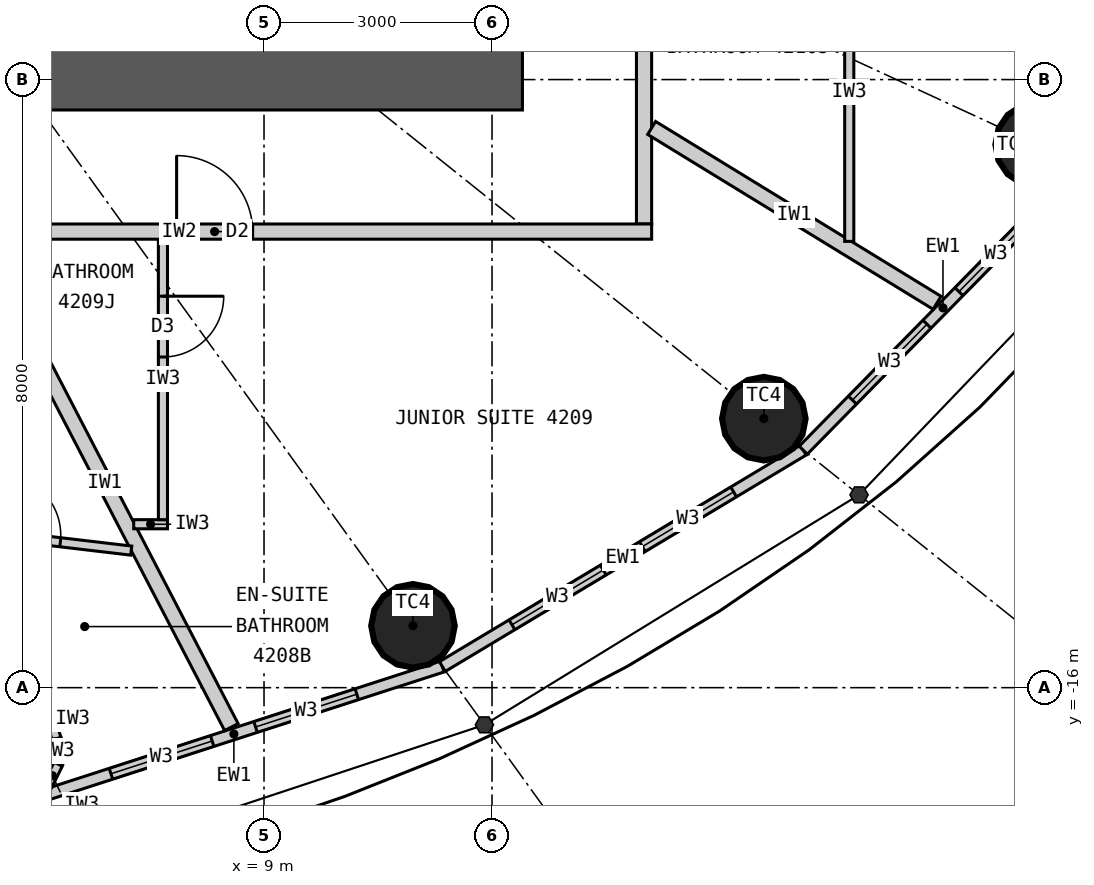
"""IFC4 building model, lengths in metres.
Left out: names, types, materials, properties, quantities, classifications, styles, units other than length and angle.
Written with IfcOpenShell. Run it as: python <this file> out.ifc"""

import sys

from ifc_helpers import new_model, si_unit, direction, frame, frame_2d, origin, origin_2d, place, context, subcontext, project, spatial, rectangle, circle, extrude, element, fill, save


model = new_model("IFC4")
c1 = context("Model", 3, precision=1e-05, world=origin(), true_north=direction((0.0, 1.0)))
c2 = subcontext(c1, "Body", "Model", "MODEL_VIEW")
j1 = project(units=[si_unit("LENGTHUNIT", "METRE"), si_unit("PLANEANGLEUNIT", "RADIAN")], contexts=[c1])
p1 = place(None, origin())
s1 = spatial("IfcSite", under=j1, at=p1, CompositionType="ELEMENT")
p2 = place(p1, origin())
s2 = spatial("IfcBuilding", under=s1, at=p2, CompositionType="ELEMENT")
p3 = place(p2, frame((0.0, 0.0, 159.9)))
s3 = spatial("IfcBuildingStorey", under=s2, at=p3, CompositionType="ELEMENT", Elevation=159.9)
for number, where, z_axis, x_axis in (
    (1, (10.96, -15.186, 0.0), (0.0, 0.0, 1.0), (1.0, 0.0, 0.0)),
    (2, (15.576, -12.461, 0.0), (0.0, 0.0, 1.0), (1.0, 0.0, 0.0)),
    (3, (19.172, -8.855, 0.0), (0.0, 0.0, 1.0), (1.0, 0.0, 0.0)),
):
    element("IfcColumn", number, at=place(p3, frame(where, z_axis=z_axis, x_axis=x_axis)), inside=s3, PredefinedType="COLUMN", context=c2, shape_type="SweptSolid", body=[
        extrude(circle(Radius=0.55, at=origin_2d()), origin(), (0.0, 0.0, 1.0), 3.3),
    ])
p4 = place(p3, frame((12.4, -8.0, 0.0), z_axis=(0.0, 0.0, 1.0), x_axis=(-1.0, 0.0, 0.0)))
e4 = element("IfcWall", 4, at=p4, inside=s3, PredefinedType="SHEAR", context=c2, shape_type="SweptSolid", body=[
    extrude(rectangle(XDim=24.8, YDim=0.8, at=frame_2d((12.4, 0.0))), origin(), (0.0, 0.0, 1.0), 3.3),
])
p5 = place(p4, frame((11.1, 0.0, 0.0)))
e5 = element("IfcOpeningElement", 5, at=p5, cuts=e4, PredefinedType="OPENING", context=c2, shape_type="SweptSolid", body=[
    extrude(rectangle(XDim=1.2, YDim=2.2, at=frame_2d((0.6, 1.1))), frame((0.0, 0.41, 0.0), z_axis=(0.0, -1.0, 0.0), x_axis=(1.0, 0.0, 0.0)), (0.0, 0.0, 1.0), 0.82),
])
p6 = place(p4, frame((18.7, 0.0, 0.0)))
e6 = element("IfcOpeningElement", 6, at=p6, cuts=e4, PredefinedType="OPENING", context=c2, shape_type="SweptSolid", body=[
    extrude(rectangle(XDim=0.9, YDim=2.2, at=frame_2d((0.45, 1.1))), frame((0.0, 0.41, 0.0), z_axis=(0.0, -1.0, 0.0), x_axis=(1.0, 0.0, 0.0)), (0.0, 0.0, 1.0), 0.82),
])
p7 = place(p3, frame((5.86, -17.497, 0.0), z_axis=(0.0, 0.0, 1.0), x_axis=(0.951432482129, 0.307857486429, 0.0)))
e7 = element("IfcWall", 7, at=p7, inside=s3, PredefinedType="ELEMENTEDWALL", context=c2, shape_type="SweptSolid", body=[
    extrude(rectangle(XDim=5.766, YDim=0.15, at=frame_2d((2.883, 0.0))), origin(), (0.0, 0.0, 1.0), 3.12),
])
p8 = place(p7, frame((1.183, 0.0, 0.9)))
e8 = element("IfcOpeningElement", 8, at=p8, cuts=e7, PredefinedType="OPENING", context=c2, shape_type="SweptSolid", body=[
    extrude(rectangle(XDim=1.4, YDim=1.9, at=frame_2d((0.7, 0.95))), frame((0.0, 0.085, 0.0), z_axis=(0.0, -1.0, 0.0), x_axis=(1.0, 0.0, 0.0)), (0.0, 0.0, 1.0), 0.17),
])
p9 = place(p7, frame((3.183, 0.0, 0.9)))
e9 = element("IfcOpeningElement", 9, at=p9, cuts=e7, PredefinedType="OPENING", context=c2, shape_type="SweptSolid", body=[
    extrude(rectangle(XDim=1.4, YDim=1.9, at=frame_2d((0.7, 0.95))), frame((0.0, 0.085, 0.0), z_axis=(0.0, -1.0, 0.0), x_axis=(1.0, 0.0, 0.0)), (0.0, 0.0, 1.0), 0.17),
])
p10 = place(p3, frame((11.346, -15.722, 0.0), z_axis=(0.0, 0.0, 1.0), x_axis=(0.857695199231, 0.514158482587, 0.0)))
e10 = element("IfcWall", 10, at=p10, inside=s3, PredefinedType="ELEMENTEDWALL", context=c2, shape_type="SweptSolid", body=[
    extrude(rectangle(XDim=5.536, YDim=0.15, at=frame_2d((2.768, 0.0))), origin(), (0.0, 0.0, 1.0), 3.12),
])
p11 = place(p10, frame((1.068, 0.0, 0.9)))
e11 = element("IfcOpeningElement", 11, at=p11, cuts=e10, PredefinedType="OPENING", context=c2, shape_type="SweptSolid", body=[
    extrude(rectangle(XDim=1.4, YDim=1.9, at=frame_2d((0.7, 0.95))), frame((0.0, 0.085, 0.0), z_axis=(0.0, -1.0, 0.0), x_axis=(1.0, 0.0, 0.0)), (0.0, 0.0, 1.0), 0.17),
])
p12 = place(p10, frame((3.068, 0.0, 0.9)))
e12 = element("IfcOpeningElement", 12, at=p12, cuts=e10, PredefinedType="OPENING", context=c2, shape_type="SweptSolid", body=[
    extrude(rectangle(XDim=1.4, YDim=1.9, at=frame_2d((0.7, 0.95))), frame((0.0, 0.085, 0.0), z_axis=(0.0, -1.0, 0.0), x_axis=(1.0, 0.0, 0.0)), (0.0, 0.0, 1.0), 0.17),
])
p13 = place(p3, frame((16.095, -12.876, 0.0), z_axis=(0.0, 0.0, 1.0), x_axis=(0.700727467776, 0.71342905457, 0.0)))
e13 = element("IfcWall", 13, at=p13, inside=s3, PredefinedType="ELEMENTEDWALL", context=c2, shape_type="SweptSolid", body=[
    extrude(rectangle(XDim=5.247, YDim=0.15, at=frame_2d((2.624, 0.0))), origin(), (0.0, 0.0, 1.0), 3.12),
])
p14 = place(p13, frame((0.924, 0.0, 0.9)))
e14 = element("IfcOpeningElement", 14, at=p14, cuts=e13, PredefinedType="OPENING", context=c2, shape_type="SweptSolid", body=[
    extrude(rectangle(XDim=1.4, YDim=1.9, at=frame_2d((0.7, 0.95))), frame((0.0, 0.085, 0.0), z_axis=(0.0, -1.0, 0.0), x_axis=(1.0, 0.0, 0.0)), (0.0, 0.0, 1.0), 0.17),
])
p15 = place(p13, frame((2.924, 0.0, 0.9)))
e15 = element("IfcOpeningElement", 15, at=p15, cuts=e13, PredefinedType="OPENING", context=c2, shape_type="SweptSolid", body=[
    extrude(rectangle(XDim=1.4, YDim=1.9, at=frame_2d((0.7, 0.95))), frame((0.0, 0.085, 0.0), z_axis=(0.0, -1.0, 0.0), x_axis=(1.0, 0.0, 0.0)), (0.0, 0.0, 1.0), 0.17),
])
p16 = place(p3, frame((14.0, -9.9, 0.0), z_axis=(0.0, 0.0, 1.0), x_axis=(0.0, 1.0, 0.0)))
e16 = element("IfcWall", 16, at=p16, inside=s3, PredefinedType="PARTITIONING", context=c2, shape_type="SweptSolid", body=[
    extrude(rectangle(XDim=19.8, YDim=0.2, at=frame_2d((9.9, 0.0))), origin(), (0.0, 0.0, 1.0), 3.12),
])
p17 = place(p16, frame((3.824, 0.0, 0.0)))
e17 = element("IfcOpeningElement", 17, at=p17, cuts=e16, PredefinedType="OPENING", context=c2, shape_type="SweptSolid", body=[
    extrude(rectangle(XDim=1.0, YDim=2.2, at=frame_2d((0.5, 1.1))), frame((0.0, 0.11, 0.0), z_axis=(0.0, -1.0, 0.0), x_axis=(1.0, 0.0, 0.0)), (0.0, 0.0, 1.0), 0.22),
])
p18 = place(p16, frame((8.719, 0.0, 0.0)))
e18 = element("IfcOpeningElement", 18, at=p18, cuts=e16, PredefinedType="OPENING", context=c2, shape_type="SweptSolid", body=[
    extrude(rectangle(XDim=1.0, YDim=2.2, at=frame_2d((0.5, 1.1))), frame((0.0, 0.11, 0.0), z_axis=(0.0, -1.0, 0.0), x_axis=(1.0, 0.0, 0.0)), (0.0, 0.0, 1.0), 0.22),
])
p19 = place(p16, frame((15.482, 0.0, 0.0)))
e19 = element("IfcOpeningElement", 19, at=p19, cuts=e16, PredefinedType="OPENING", context=c2, shape_type="SweptSolid", body=[
    extrude(rectangle(XDim=1.0, YDim=2.2, at=frame_2d((0.5, 1.1))), frame((0.0, 0.11, 0.0), z_axis=(0.0, -1.0, 0.0), x_axis=(1.0, 0.0, 0.0)), (0.0, 0.0, 1.0), 0.22),
])
p20 = place(p3, frame((5.24, -10.1, 0.0), z_axis=(0.0, 0.0, 1.0), x_axis=(0.460532965373, -0.887642601391, 0.0)))
e20 = element("IfcWall", 20, at=p20, inside=s3, PredefinedType="PARTITIONING", context=c2, shape_type="SweptSolid", body=[
    extrude(rectangle(XDim=7.231, YDim=0.2, at=frame_2d((3.616, 0.0))), origin(), (0.0, 0.0, 1.0), 3.12),
])
p21 = place(p3, frame((14.1, -8.636, 0.0), z_axis=(0.0, 0.0, 1.0), x_axis=(0.852731884196, -0.522348862041, 0.0)))
e21 = element("IfcWall", 21, at=p21, inside=s3, PredefinedType="PARTITIONING", context=c2, shape_type="SweptSolid", body=[
    extrude(rectangle(XDim=4.404, YDim=0.2, at=frame_2d((2.202, 0.0))), origin(), (0.0, 0.0, 1.0), 3.12),
])
p22 = place(p3, frame((7.253, -14.197, 0.0), z_axis=(0.0, 0.0, 1.0), x_axis=(-0.993128188393, 0.117031625725, 0.0)))
e22 = element("IfcWall", 22, at=p22, inside=s3, PredefinedType="PARTITIONING", context=c2, shape_type="SweptSolid", body=[
    extrude(rectangle(XDim=2.678, YDim=0.12, at=frame_2d((1.339, 0.0))), origin(), (0.0, 0.0, 1.0), 3.12),
])
p23 = place(p22, frame((0.939, 0.0, 0.0)))
e23 = element("IfcOpeningElement", 23, at=p23, cuts=e22, PredefinedType="OPENING", context=c2, shape_type="SweptSolid", body=[
    extrude(rectangle(XDim=0.8, YDim=2.1, at=frame_2d((0.4, 1.05))), frame((0.0, 0.07, 0.0), z_axis=(0.0, -1.0, 0.0), x_axis=(1.0, 0.0, 0.0)), (0.0, 0.0, 1.0), 0.14),
])
p24 = place(p3, frame((6.097, -16.149, 0.0), z_axis=(0.0, 0.0, 1.0), x_axis=(0.317292604854, -0.948327687514, 0.0)))
e24 = element("IfcWall", 24, at=p24, inside=s3, PredefinedType="PARTITIONING", context=c2, shape_type="SweptSolid", body=[
    extrude(rectangle(XDim=0.55, YDim=0.12, at=frame_2d((0.275, 0.0))), origin(), (0.0, 0.0, 1.0), 3.12),
])
for number, where, z_axis, x_axis in (
    (25, (6.271, -16.67, 0.0), (0.0, 0.0, 1.0), (0.061, -0.998, 0.0)),
    (26, (6.292, -17.007, 0.0), (0.0, 0.0, 1.0), (-0.445, -0.895, 0.0)),
):
    element("IfcWall", number, at=place(p3, frame(where, z_axis=z_axis, x_axis=x_axis)), inside=s3, PredefinedType="PARTITIONING", context=c2, shape_type="SweptSolid", body=[
        extrude(rectangle(XDim=0.338, YDim=0.12, at=frame_2d((0.169, 0.0))), origin(), (0.0, 0.0, 1.0), 3.12),
    ])
p25 = place(p3, frame((7.286, -13.85, 0.0), z_axis=(0.0, 0.0, 1.0), x_axis=(1.0, 0.0, 0.0)))
e27 = element("IfcWall", 27, at=p25, inside=s3, PredefinedType="PARTITIONING", context=c2, shape_type="SweptSolid", body=[
    extrude(rectangle(XDim=0.444, YDim=0.12, at=frame_2d((0.222, 0.0))), origin(), (0.0, 0.0, 1.0), 3.12),
])
p26 = place(p3, frame((7.67, -10.1, 0.0), z_axis=(0.0, 0.0, 1.0), x_axis=(0.0, -1.0, 0.0)))
e28 = element("IfcWall", 28, at=p26, inside=s3, PredefinedType="PARTITIONING", context=c2, shape_type="SweptSolid", body=[
    extrude(rectangle(XDim=3.69, YDim=0.12, at=frame_2d((1.845, 0.0))), origin(), (0.0, 0.0, 1.0), 3.12),
])
p27 = place(p26, frame((0.75, 0.0, 0.0)))
e29 = element("IfcOpeningElement", 29, at=p27, cuts=e28, PredefinedType="OPENING", context=c2, shape_type="SweptSolid", body=[
    extrude(rectangle(XDim=0.8, YDim=2.1, at=frame_2d((0.4, 1.05))), frame((0.0, 0.07, 0.0), z_axis=(0.0, -1.0, 0.0), x_axis=(1.0, 0.0, 0.0)), (0.0, 0.0, 1.0), 0.14),
])
p28 = place(p3, frame((16.7, -10.129, 0.0), z_axis=(0.0, 0.0, 1.0), x_axis=(0.0, 1.0, 0.0)))
e30 = element("IfcWall", 30, at=p28, inside=s3, PredefinedType="PARTITIONING", context=c2, shape_type="SweptSolid", body=[
    extrude(rectangle(XDim=3.933, YDim=0.12, at=frame_2d((1.966, 0.0))), origin(), (0.0, 0.0, 1.0), 3.12),
])
p29 = place(p3, frame((14.1, -10.0, 0.0), z_axis=(0.0, 0.0, 1.0), x_axis=(-1.0, 0.0, 0.0)))
e31 = element("IfcWall", 31, at=p29, inside=s3, PredefinedType="PARTITIONING", context=c2, shape_type="SweptSolid", body=[
    extrude(rectangle(XDim=12.43, YDim=0.2, at=frame_2d((6.215, 0.0))), origin(), (0.0, 0.0, 1.0), 3.12),
])
p30 = place(p29, frame((5.25, 0.0, 0.0)))
e32 = element("IfcOpeningElement", 32, at=p30, cuts=e31, PredefinedType="OPENING", context=c2, shape_type="SweptSolid", body=[
    extrude(rectangle(XDim=1.0, YDim=2.2, at=frame_2d((0.5, 1.1))), frame((0.0, 0.11, 0.0), z_axis=(0.0, -1.0, 0.0), x_axis=(1.0, 0.0, 0.0)), (0.0, 0.0, 1.0), 0.22),
])
p31 = place(p8, origin())
e33 = element("IfcWindow", 33, at=p31, inside=s3, PartitioningType="SINGLE_PANEL", PredefinedType="WINDOW", context=c2, shape_type="SweptSolid", body=[
    extrude(rectangle(XDim=1.4, YDim=1.9, at=frame_2d((0.7, 0.95))), frame((0.0, 0.03, 0.0), z_axis=(0.0, -1.0, 0.0), x_axis=(1.0, 0.0, 0.0)), (0.0, 0.0, 1.0), 0.06),
])
fill(e8, e33)
p32 = place(p9, origin())
e34 = element("IfcWindow", 34, at=p32, inside=s3, PartitioningType="SINGLE_PANEL", PredefinedType="WINDOW", context=c2, shape_type="SweptSolid", body=[
    extrude(rectangle(XDim=1.4, YDim=1.9, at=frame_2d((0.7, 0.95))), frame((0.0, 0.03, 0.0), z_axis=(0.0, -1.0, 0.0), x_axis=(1.0, 0.0, 0.0)), (0.0, 0.0, 1.0), 0.06),
])
fill(e9, e34)
p33 = place(p11, origin())
e35 = element("IfcWindow", 35, at=p33, inside=s3, PartitioningType="SINGLE_PANEL", PredefinedType="WINDOW", context=c2, shape_type="SweptSolid", body=[
    extrude(rectangle(XDim=1.4, YDim=1.9, at=frame_2d((0.7, 0.95))), frame((0.0, 0.03, 0.0), z_axis=(0.0, -1.0, 0.0), x_axis=(1.0, 0.0, 0.0)), (0.0, 0.0, 1.0), 0.06),
])
fill(e11, e35)
p34 = place(p12, origin())
e36 = element("IfcWindow", 36, at=p34, inside=s3, PartitioningType="SINGLE_PANEL", PredefinedType="WINDOW", context=c2, shape_type="SweptSolid", body=[
    extrude(rectangle(XDim=1.4, YDim=1.9, at=frame_2d((0.7, 0.95))), frame((0.0, 0.03, 0.0), z_axis=(0.0, -1.0, 0.0), x_axis=(1.0, 0.0, 0.0)), (0.0, 0.0, 1.0), 0.06),
])
fill(e12, e36)
p35 = place(p14, origin())
e37 = element("IfcWindow", 37, at=p35, inside=s3, PartitioningType="SINGLE_PANEL", PredefinedType="WINDOW", context=c2, shape_type="SweptSolid", body=[
    extrude(rectangle(XDim=1.4, YDim=1.9, at=frame_2d((0.7, 0.95))), frame((0.0, 0.03, 0.0), z_axis=(0.0, -1.0, 0.0), x_axis=(1.0, 0.0, 0.0)), (0.0, 0.0, 1.0), 0.06),
])
fill(e14, e37)
p36 = place(p15, origin())
e38 = element("IfcWindow", 38, at=p36, inside=s3, PartitioningType="SINGLE_PANEL", PredefinedType="WINDOW", context=c2, shape_type="SweptSolid", body=[
    extrude(rectangle(XDim=1.4, YDim=1.9, at=frame_2d((0.7, 0.95))), frame((0.0, 0.03, 0.0), z_axis=(0.0, -1.0, 0.0), x_axis=(1.0, 0.0, 0.0)), (0.0, 0.0, 1.0), 0.06),
])
fill(e15, e38)
p37 = place(p23, origin())
e39 = element("IfcDoor", 39, at=p37, inside=s3, OperationType="SINGLE_SWING_RIGHT", PredefinedType="DOOR", context=c2, shape_type="SweptSolid", body=[
    extrude(rectangle(XDim=0.8, YDim=2.1, at=frame_2d((0.4, 1.05))), frame((0.0, 0.025, 0.0), z_axis=(0.0, -1.0, 0.0), x_axis=(1.0, 0.0, 0.0)), (0.0, 0.0, 1.0), 0.05),
])
fill(e23, e39)
p38 = place(p27, origin())
e40 = element("IfcDoor", 40, at=p38, inside=s3, OperationType="SINGLE_SWING_LEFT", PredefinedType="DOOR", context=c2, shape_type="SweptSolid", body=[
    extrude(rectangle(XDim=0.8, YDim=2.1, at=frame_2d((0.4, 1.05))), frame((0.0, 0.025, 0.0), z_axis=(0.0, -1.0, 0.0), x_axis=(1.0, 0.0, 0.0)), (0.0, 0.0, 1.0), 0.05),
])
fill(e29, e40)
p39 = place(p30, origin())
e41 = element("IfcDoor", 41, at=p39, inside=s3, OperationType="SINGLE_SWING_RIGHT", PredefinedType="DOOR", context=c2, shape_type="SweptSolid", body=[
    extrude(rectangle(XDim=1.0, YDim=2.2, at=frame_2d((0.5, 1.1))), frame((0.0, 0.025, 0.0), z_axis=(0.0, -1.0, 0.0), x_axis=(1.0, 0.0, 0.0)), (0.0, 0.0, 1.0), 0.05),
])
fill(e32, e41)
save(model, sys.argv[1])
